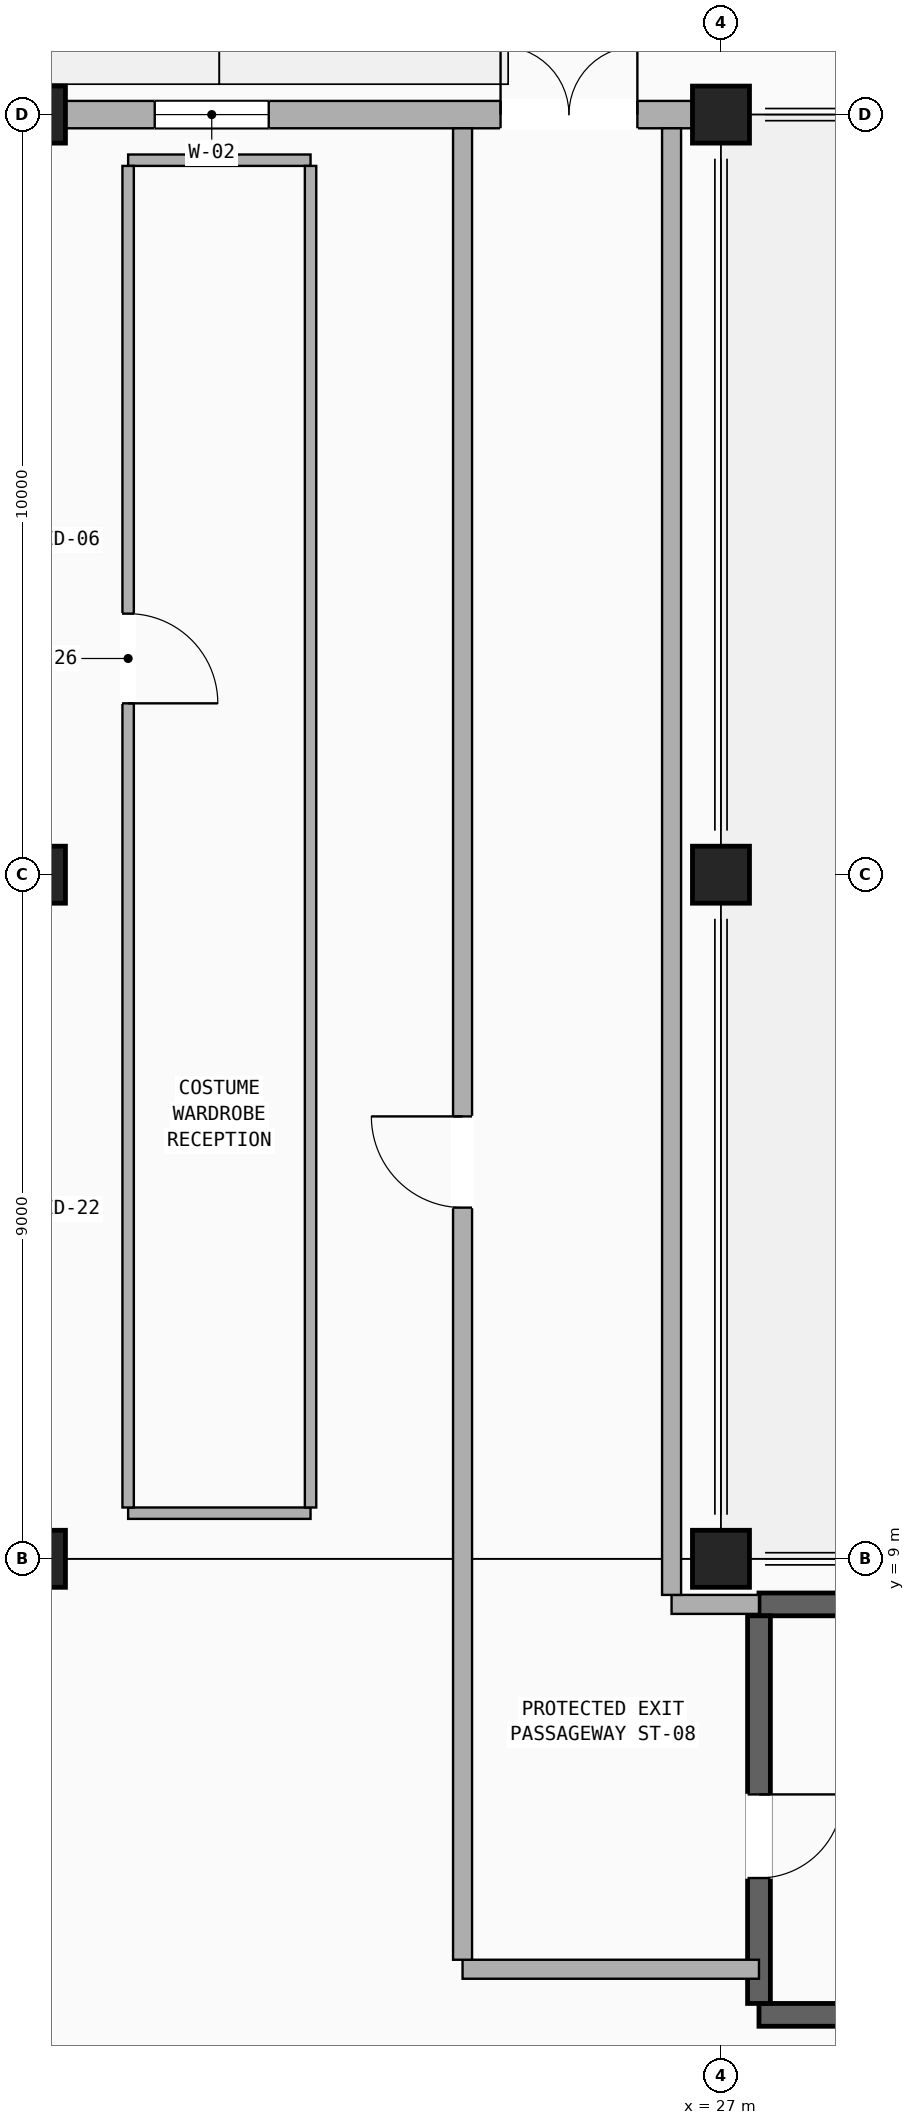
"""IFC4 building model, lengths in metres.
Left out: names, types, materials, properties, quantities, classifications, styles, units other than length and angle.
Written with IfcOpenShell. Run it as: python <this file> out.ifc"""

import sys

from ifc_helpers import new_model, si_unit, direction, frame, frame_2d, origin, origin_2d, place, context, subcontext, project, spatial, rectangle, extrude, element, fill, save


model = new_model("IFC4")
c1 = context("Model", 3, precision=1e-05, world=origin(), true_north=direction((0.0, 1.0)))
c2 = subcontext(c1, "Body", "Model", "MODEL_VIEW")
j1 = project(units=[si_unit("LENGTHUNIT", "METRE"), si_unit("PLANEANGLEUNIT", "RADIAN")], contexts=[c1])
p1 = place(None, origin())
s1 = spatial("IfcSite", under=j1, at=p1, CompositionType="ELEMENT")
p2 = place(p1, origin())
s2 = spatial("IfcBuilding", under=s1, at=p2, CompositionType="ELEMENT")
p3 = place(p2, origin())
s3 = spatial("IfcBuildingStorey", under=s2, at=p3, CompositionType="ELEMENT", Elevation=0.0)
for number, where, z_axis, x_axis in (
    (1, (18.0, 9.0, 0.0), (0.0, 0.0, 1.0), (1.0, 0.0, 0.0)),
    (2, (18.0, 18.0, 0.0), (0.0, 0.0, 1.0), (1.0, 0.0, 0.0)),
    (3, (18.0, 28.0, 0.0), (0.0, 0.0, 1.0), (1.0, 0.0, 0.0)),
    (4, (27.0, 9.0, 0.0), (0.0, 0.0, 1.0), (1.0, 0.0, 0.0)),
    (5, (27.0, 18.0, 0.0), (0.0, 0.0, 1.0), (1.0, 0.0, 0.0)),
    (6, (27.0, 28.0, 0.0), (0.0, 0.0, 1.0), (1.0, 0.0, 0.0)),
):
    element("IfcColumn", number, at=place(p3, frame(where, z_axis=z_axis, x_axis=x_axis)), inside=s3, PredefinedType="COLUMN", context=c2, shape_type="SweptSolid", body=[
        extrude(rectangle(XDim=0.75, YDim=0.75, at=origin_2d()), origin(), (0.0, 0.0, 1.0), 5.1),
    ])
for number, where, z_axis, x_axis in (
    (7, (27.5, 3.0, 0.0), (0.0, 0.0, 1.0), (1.0, 0.0, 0.0)),
    (8, (27.5, 8.4, 0.0), (0.0, 0.0, 1.0), (1.0, 0.0, 0.0)),
):
    element("IfcWall", number, at=place(p3, frame(where, z_axis=z_axis, x_axis=x_axis)), inside=s3, PredefinedType="SHEAR", context=c2, shape_type="SweptSolid", body=[
        extrude(rectangle(XDim=10.3, YDim=0.3, at=frame_2d((5.15, 0.0))), origin(), (0.0, 0.0, 1.0), 5.1),
    ])
p4 = place(p3, frame((27.5, 3.15, 0.0), z_axis=(0.0, 0.0, 1.0), x_axis=(0.0, 1.0, 0.0)))
e9 = element("IfcWall", 9, at=p4, inside=s3, PredefinedType="SHEAR", context=c2, shape_type="SweptSolid", body=[
    extrude(rectangle(XDim=5.1, YDim=0.3, at=frame_2d((2.55, 0.0))), origin(), (0.0, 0.0, 1.0), 5.1),
])
p5 = place(p4, frame((1.65, 0.0, 0.0)))
e10 = element("IfcOpeningElement", 10, at=p5, cuts=e9, PredefinedType="OPENING", context=c2, shape_type="SweptSolid", body=[
    extrude(rectangle(XDim=1.1, YDim=2.2, at=frame_2d((0.55, 1.1))), frame((0.0, 0.16, 0.0), z_axis=(0.0, -1.0, 0.0), x_axis=(1.0, 0.0, 0.0)), (0.0, 0.0, 1.0), 0.32),
])
p6 = place(p3, frame((18.375, 28.0, 0.0), z_axis=(0.0, 0.0, 1.0), x_axis=(1.0, 0.0, 0.0)))
e11 = element("IfcWall", 11, at=p6, inside=s3, PredefinedType="STANDARD", context=c2, shape_type="SweptSolid", body=[
    extrude(rectangle(XDim=8.25, YDim=0.36, at=frame_2d((4.125, 0.0))), origin(), (0.0, 0.0, 1.0), 3.98),
])
p7 = place(p6, frame((5.725, 0.0, 0.0)))
e12 = element("IfcOpeningElement", 12, at=p7, cuts=e11, PredefinedType="OPENING", context=c2, shape_type="SweptSolid", body=[
    extrude(rectangle(XDim=1.8, YDim=2.3, at=frame_2d((0.9, 1.15))), frame((0.0, 0.19, 0.0), z_axis=(0.0, -1.0, 0.0), x_axis=(1.0, 0.0, 0.0)), (0.0, 0.0, 1.0), 0.38),
])
p8 = place(p6, frame((1.175, 0.0, 0.9)))
e13 = element("IfcOpeningElement", 13, at=p8, cuts=e11, PredefinedType="OPENING", context=c2, shape_type="SweptSolid", body=[
    extrude(rectangle(XDim=1.5, YDim=2.1, at=frame_2d((0.75, 1.05))), frame((0.0, 0.19, 0.0), z_axis=(0.0, -1.0, 0.0), x_axis=(1.0, 0.0, 0.0)), (0.0, 0.0, 1.0), 0.38),
])
for number, where, z_axis, x_axis in (
    (14, (19.2, 9.6, 0.0), (0.0, 0.0, 1.0), (1.0, 0.0, 0.0)),
    (15, (19.2, 27.4, 0.0), (0.0, 0.0, 1.0), (1.0, 0.0, 0.0)),
):
    element("IfcWall", number, at=place(p3, frame(where, z_axis=z_axis, x_axis=x_axis)), inside=s3, PredefinedType="PARTITIONING", context=c2, shape_type="SweptSolid", body=[
        extrude(rectangle(XDim=2.4, YDim=0.15, at=frame_2d((1.2, 0.0))), origin(), (0.0, 0.0, 1.0), 4.85),
    ])
p9 = place(p3, frame((19.2, 9.675, 0.0), z_axis=(0.0, 0.0, 1.0), x_axis=(0.0, 1.0, 0.0)))
e16 = element("IfcWall", 16, at=p9, inside=s3, PredefinedType="PARTITIONING", context=c2, shape_type="SweptSolid", body=[
    extrude(rectangle(XDim=17.65, YDim=0.15, at=frame_2d((8.825, 0.0))), origin(), (0.0, 0.0, 1.0), 3.85),
])
p10 = place(p9, frame((10.58, 0.0, 0.0)))
e17 = element("IfcOpeningElement", 17, at=p10, cuts=e16, PredefinedType="OPENING", context=c2, shape_type="SweptSolid", body=[
    extrude(rectangle(XDim=1.18, YDim=2.14, at=frame_2d((0.59, 1.07))), frame((0.0, 0.085, 0.0), z_axis=(0.0, -1.0, 0.0), x_axis=(1.0, 0.0, 0.0)), (0.0, 0.0, 1.0), 0.17),
])
p11 = place(p3, frame((21.6, 9.675, 0.0), z_axis=(0.0, 0.0, 1.0), x_axis=(0.0, 1.0, 0.0)))
e18 = element("IfcWall", 18, at=p11, inside=s3, PredefinedType="PARTITIONING", context=c2, shape_type="SweptSolid", body=[
    extrude(rectangle(XDim=17.65, YDim=0.15, at=frame_2d((8.825, 0.0))), origin(), (0.0, 0.0, 1.0), 3.85),
])
p12 = place(p3, frame((23.6, 3.6, 0.0), z_axis=(0.0, 0.0, 1.0), x_axis=(1.0, 0.0, 0.0)))
e19 = element("IfcWall", 19, at=p12, inside=s3, PredefinedType="PARTITIONING", context=c2, shape_type="SweptSolid", body=[
    extrude(rectangle(XDim=3.9, YDim=0.25, at=frame_2d((1.95, 0.0))), origin(), (0.0, 0.0, 1.0), 4.15),
])
p13 = place(p3, frame((27.5, 8.4, 0.0), z_axis=(0.0, 0.0, 1.0), x_axis=(-1.0, 0.0, 0.0)))
e20 = element("IfcWall", 20, at=p13, inside=s3, PredefinedType="PARTITIONING", context=c2, shape_type="SweptSolid", body=[
    extrude(rectangle(XDim=1.15, YDim=0.25, at=frame_2d((0.575, 0.0))), origin(), (0.0, 0.0, 1.0), 4.15),
])
p14 = place(p3, frame((26.35, 8.525, 0.0), z_axis=(0.0, 0.0, 1.0), x_axis=(0.0, 1.0, 0.0)))
e21 = element("IfcWall", 21, at=p14, inside=s3, PredefinedType="PARTITIONING", context=c2, shape_type="SweptSolid", body=[
    extrude(rectangle(XDim=19.295, YDim=0.25, at=frame_2d((9.647, 0.0))), origin(), (0.0, 0.0, 1.0), 3.85),
])
p15 = place(p3, frame((23.6, 27.82, 0.0), z_axis=(0.0, 0.0, 1.0), x_axis=(0.0, -1.0, 0.0)))
e22 = element("IfcWall", 22, at=p15, inside=s3, PredefinedType="PARTITIONING", context=c2, shape_type="SweptSolid", body=[
    extrude(rectangle(XDim=24.095, YDim=0.25, at=frame_2d((12.047, 0.0))), origin(), (0.0, 0.0, 1.0), 3.85),
])
p16 = place(p15, frame((13.0, 0.0, 0.0)))
e23 = element("IfcOpeningElement", 23, at=p16, cuts=e22, PredefinedType="OPENING", context=c2, shape_type="SweptSolid", body=[
    extrude(rectangle(XDim=1.2, YDim=2.2, at=frame_2d((0.6, 1.1))), frame((0.0, 0.135, 0.0), z_axis=(0.0, -1.0, 0.0), x_axis=(1.0, 0.0, 0.0)), (0.0, 0.0, 1.0), 0.27),
])
p17 = place(p7, origin())
e24 = element("IfcDoor", 24, at=p17, inside=s3, OperationType="DOUBLE_DOOR_SINGLE_SWING", PredefinedType="DOOR", context=c2, shape_type="SweptSolid", body=[
    extrude(rectangle(XDim=1.8, YDim=2.3, at=frame_2d((0.9, 1.15))), frame((0.0, 0.025, 0.0), z_axis=(0.0, -1.0, 0.0), x_axis=(1.0, 0.0, 0.0)), (0.0, 0.0, 1.0), 0.05),
])
fill(e12, e24)
p18 = place(p8, origin())
e25 = element("IfcWindow", 25, at=p18, inside=s3, PartitioningType="DOUBLE_PANEL_VERTICAL", PredefinedType="WINDOW", context=c2, shape_type="SweptSolid", body=[
    extrude(rectangle(XDim=1.5, YDim=2.1, at=frame_2d((0.75, 1.05))), frame((0.0, 0.03, 0.0), z_axis=(0.0, -1.0, 0.0), x_axis=(1.0, 0.0, 0.0)), (0.0, 0.0, 1.0), 0.06),
])
fill(e13, e25)
p19 = place(p5, frame((1.1, 0.0, 0.0), z_axis=(0.0, 0.0, 1.0), x_axis=(-1.0, 0.0, 0.0)))
e26 = element("IfcDoor", 26, at=p19, inside=s3, OperationType="SINGLE_SWING_LEFT", PredefinedType="DOOR", context=c2, shape_type="SweptSolid", body=[
    extrude(rectangle(XDim=1.1, YDim=2.2, at=frame_2d((0.55, 1.1))), frame((0.0, 0.025, 0.0), z_axis=(0.0, -1.0, 0.0), x_axis=(1.0, 0.0, 0.0)), (0.0, 0.0, 1.0), 0.05),
])
fill(e10, e26)
p20 = place(p10, frame((1.18, 0.0, 0.0), z_axis=(0.0, 0.0, 1.0), x_axis=(-1.0, 0.0, 0.0)))
e27 = element("IfcDoor", 27, at=p20, inside=s3, OperationType="SINGLE_SWING_RIGHT", PredefinedType="DOOR", context=c2, shape_type="SweptSolid", body=[
    extrude(rectangle(XDim=1.18, YDim=2.14, at=frame_2d((0.59, 1.07))), frame((0.0, 0.025, 0.0), z_axis=(0.0, -1.0, 0.0), x_axis=(1.0, 0.0, 0.0)), (0.0, 0.0, 1.0), 0.05),
])
fill(e17, e27)
p21 = place(p16, frame((1.2, 0.0, 0.0), z_axis=(0.0, 0.0, 1.0), x_axis=(-1.0, 0.0, 0.0)))
e28 = element("IfcDoor", 28, at=p21, inside=s3, OperationType="SINGLE_SWING_RIGHT", PredefinedType="DOOR", context=c2, shape_type="SweptSolid", body=[
    extrude(rectangle(XDim=1.2, YDim=2.2, at=frame_2d((0.6, 1.1))), frame((0.0, 0.025, 0.0), z_axis=(0.0, -1.0, 0.0), x_axis=(1.0, 0.0, 0.0)), (0.0, 0.0, 1.0), 0.05),
])
fill(e23, e28)
save(model, sys.argv[1])
